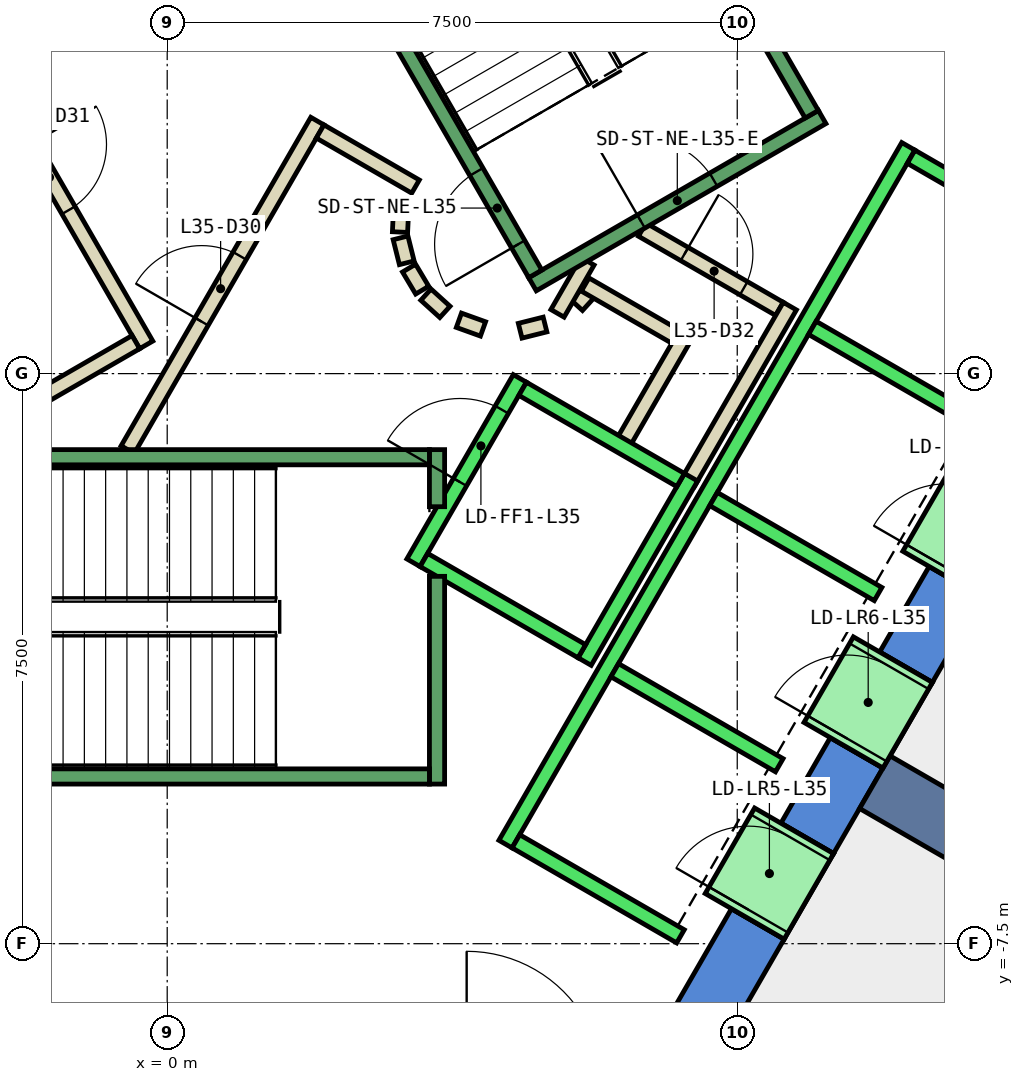
"""IFC4 building model, lengths in metres.
Left out: names, types, materials, properties, quantities, classifications, styles, units other than length and angle.
Written with IfcOpenShell. Run it as: python <this file> out.ifc"""

import sys

from ifc_helpers import new_model, si_unit, direction, frame, frame_2d, origin, place, context, subcontext, project, spatial, polyline, rectangle, outline, extrude, element, fill, save


model = new_model("IFC4")
c1 = context("Model", 3, precision=1e-05, world=origin(), true_north=direction((0.0, 1.0)))
c2 = subcontext(c1, "Body", "Model", "MODEL_VIEW")
j1 = project(units=[si_unit("LENGTHUNIT", "METRE"), si_unit("PLANEANGLEUNIT", "RADIAN")], contexts=[c1])
p1 = place(None, origin())
s1 = spatial("IfcSite", under=j1, at=p1, CompositionType="ELEMENT")
p2 = place(p1, origin())
s2 = spatial("IfcBuilding", under=s1, at=p2, CompositionType="ELEMENT")
p3 = place(p2, frame((0.0, 0.0, 159.2)))
s3 = spatial("IfcBuildingStorey", under=s2, at=p3, CompositionType="ELEMENT", Elevation=159.2)
p4 = place(p3, frame((0.0, 0.0, -0.4)))
e1 = element("IfcWall", 1, at=p4, inside=s3, PredefinedType="SHEAR", context=c2, shape_type="SweptSolid", body=[
    extrude(outline(polyline([(8.517, 11.748), (7.824, 11.348), (12.933, 2.5), (13.856, 2.5), (8.517, 11.748)])), origin(), (0.0, 0.0, 1.0), 4.2),
])
p5 = place(p3, frame((0.0, 0.0, -0.4)))
e2 = element("IfcWall", 2, at=p5, inside=s3, PredefinedType="SHEAR", context=c2, shape_type="SweptSolid", body=[
    extrude(outline(polyline([(8.117, -7.44), (7.424, -7.04), (6.466, -8.7), (6.928, -9.5), (8.117, -7.44)])), origin(), (0.0, 0.0, 1.0), 4.2),
])
p6 = place(p3, frame((0.0, 0.0, -0.4)))
e3 = element("IfcWall", 3, at=p6, inside=s3, PredefinedType="SHEAR", context=c2, shape_type="SweptSolid", body=[
    extrude(outline(polyline([(9.417, -5.189), (8.724, -4.789), (8.075, -5.914), (8.767, -6.314), (9.417, -5.189)])), origin(), (0.0, 0.0, 1.0), 4.2),
])
p7 = place(p3, frame((0.0, 0.0, -0.4)))
e4 = element("IfcWall", 4, at=p7, inside=s3, PredefinedType="SHEAR", context=c2, shape_type="SweptSolid", body=[
    extrude(outline(polyline([(10.717, -2.937), (10.025, -2.537), (9.374, -3.663), (10.067, -4.063), (10.717, -2.937)])), origin(), (0.0, 0.0, 1.0), 4.2),
])
p8 = place(p3, frame((0.0, 0.0, 3.6)))
e5 = element("IfcWall", 5, at=p8, inside=s3, PredefinedType="SHEAR", context=c2, shape_type="SweptSolid", body=[
    extrude(outline(polyline([(8.767, -6.314), (8.075, -5.914), (7.424, -7.04), (8.117, -7.44), (8.767, -6.314)])), origin(), (0.0, 0.0, 1.0), 0.2),
])
p9 = place(p3, frame((0.0, 0.0, 3.6)))
e6 = element("IfcWall", 6, at=p9, inside=s3, PredefinedType="SHEAR", context=c2, shape_type="SweptSolid", body=[
    extrude(outline(polyline([(10.067, -4.063), (9.374, -3.663), (8.724, -4.789), (9.417, -5.189), (10.067, -4.063)])), origin(), (0.0, 0.0, 1.0), 0.2),
])
p10 = place(p3, frame((0.0, 0.0, 3.6)))
e7 = element("IfcWall", 7, at=p10, inside=s3, PredefinedType="SHEAR", context=c2, shape_type="SweptSolid", body=[
    extrude(outline(polyline([(11.367, -1.811), (10.675, -1.411), (10.025, -2.537), (10.717, -2.937), (11.367, -1.811)])), origin(), (0.0, 0.0, 1.0), 0.2),
])
p11 = place(p3, frame((9.31, -5.375, -0.4), z_axis=(0.0, 0.0, 1.0), x_axis=(0.866017533419, -0.500013631625, 0.0)))
e8 = element("IfcWall", 8, at=p11, inside=s3, PredefinedType="SHEAR", context=c2, shape_type="SweptSolid", body=[
    extrude(rectangle(XDim=9.0, YDim=0.8, at=frame_2d((4.5, 0.0))), origin(), (0.0, 0.0, 1.0), 4.2),
])
p12 = place(p3, frame((5.39, 0.898, 0.0), z_axis=(0.0, 0.0, 1.0), x_axis=(0.673828488714, 0.738887791073, 0.0)))
e9 = element("IfcWall", 9, at=p12, inside=s3, PredefinedType="PARTITIONING", context=c2, shape_type="SweptSolid", body=[
    extrude(rectangle(XDim=0.263, YDim=0.2, at=frame_2d((0.131, 0.0))), origin(), (0.0, 0.0, 1.0), 3.8),
])
p13 = place(p3, frame((5.499, 1.172, 0.0), z_axis=(0.0, 0.0, 1.0), x_axis=(0.866333505267, -0.499465972466, 0.0)))
e10 = element("IfcWall", 10, at=p13, inside=s3, PredefinedType="PARTITIONING", context=c2, shape_type="SweptSolid", body=[
    extrude(rectangle(XDim=1.374, YDim=0.2, at=frame_2d((0.687, 0.0))), origin(), (0.0, 0.0, 1.0), 3.8),
])
p14 = place(p3, frame((6.826, 0.522, 0.0), z_axis=(0.0, 0.0, 1.0), x_axis=(-0.500016722714, -0.866015748706, 0.0)))
e11 = element("IfcWall", 11, at=p14, inside=s3, PredefinedType="PARTITIONING", context=c2, shape_type="SweptSolid", body=[
    extrude(rectangle(XDim=1.7, YDim=0.2, at=frame_2d((0.85, 0.0))), origin(), (0.0, 0.0, 1.0), 3.8),
])
p15 = place(p3, frame((6.25, 1.894, 0.0), z_axis=(0.0, 0.0, 1.0), x_axis=(0.866043184279, -0.499969202016, 0.0)))
e12 = element("IfcWall", 12, at=p15, inside=s3, PredefinedType="PARTITIONING", context=c2, shape_type="SweptSolid", body=[
    extrude(rectangle(XDim=2.084, YDim=0.2, at=frame_2d((1.042, 0.0))), origin(), (0.0, 0.0, 1.0), 3.8),
])
p16 = place(p15, frame((0.642, 0.0, 0.0)))
e13 = element("IfcOpeningElement", 13, at=p16, cuts=e12, PredefinedType="OPENING", context=c2, shape_type="SweptSolid", body=[
    extrude(rectangle(XDim=0.9, YDim=2.1, at=frame_2d((0.45, 1.05))), frame((0.0, 0.11, 0.0), z_axis=(0.0, -1.0, 0.0), x_axis=(1.0, 0.0, 0.0)), (0.0, 0.0, 1.0), 0.22),
])
p17 = place(p3, frame((8.192, 0.888, 0.0), z_axis=(0.0, 0.0, 1.0), x_axis=(-0.499940625693, -0.866059680843, 0.0)))
e14 = element("IfcWall", 14, at=p17, inside=s3, PredefinedType="PARTITIONING", context=c2, shape_type="SweptSolid", body=[
    extrude(rectangle(XDim=2.68, YDim=0.2, at=frame_2d((1.34, 0.0))), origin(), (0.0, 0.0, 1.0), 3.8),
])
p18 = place(p3, frame((5.135, 0.793, 0.0), z_axis=(0.0, 0.0, 1.0), x_axis=(0.499526442893, 0.866298639529, 0.0)))
e15 = element("IfcWall", 15, at=p18, inside=s3, PredefinedType="PARTITIONING", context=c2, shape_type="SweptSolid", body=[
    extrude(rectangle(XDim=0.791, YDim=0.2, at=frame_2d((0.396, 0.0))), origin(), (0.0, 0.0, 1.0), 3.8),
])
p19 = place(p3, frame((-0.52, -1.0, 0.0), z_axis=(0.0, 0.0, 1.0), x_axis=(0.50011622646, 0.865958290007, 0.0)))
e16 = element("IfcWall", 16, at=p19, inside=s3, PredefinedType="PARTITIONING", context=c2, shape_type="SweptSolid", body=[
    extrude(rectangle(XDim=4.991, YDim=0.2, at=frame_2d((2.496, 0.0))), origin(), (0.0, 0.0, 1.0), 3.8),
])
p20 = place(p19, frame((1.945, 0.0, 0.0)))
e17 = element("IfcOpeningElement", 17, at=p20, cuts=e16, PredefinedType="OPENING", context=c2, shape_type="SweptSolid", body=[
    extrude(rectangle(XDim=1.0, YDim=2.1, at=frame_2d((0.5, 1.05))), frame((0.0, 0.11, 0.0), z_axis=(0.0, -1.0, 0.0), x_axis=(1.0, 0.0, 0.0)), (0.0, 0.0, 1.0), 0.22),
])
p21 = place(p3, frame((2.012, 3.186, 0.0), z_axis=(0.0, 0.0, 1.0), x_axis=(0.865891012941, -0.500232699559, 0.0)))
e18 = element("IfcWall", 18, at=p21, inside=s3, PredefinedType="PARTITIONING", context=c2, shape_type="SweptSolid", body=[
    extrude(rectangle(XDim=1.449, YDim=0.2, at=frame_2d((0.725, 0.0))), origin(), (0.0, 0.0, 1.0), 3.8),
])
p22 = place(p3, frame((3.079, 2.199, 0.0), z_axis=(0.0, 0.0, 1.0), x_axis=(-0.047771483479, -0.998858290933, 0.0)))
e19 = element("IfcWall", 19, at=p22, inside=s3, PredefinedType="PARTITIONING", context=c2, shape_type="SweptSolid", body=[
    extrude(rectangle(XDim=0.337, YDim=0.2, at=frame_2d((0.169, 0.0))), origin(), (0.0, 0.0, 1.0), 3.8),
])
p23 = place(p3, frame((3.07, 1.786, 0.0), z_axis=(0.0, 0.0, 1.0), x_axis=(0.242705583207, -0.970099994784, 0.0)))
e20 = element("IfcWall", 20, at=p23, inside=s3, PredefinedType="PARTITIONING", context=c2, shape_type="SweptSolid", body=[
    extrude(rectangle(XDim=0.338, YDim=0.2, at=frame_2d((0.169, 0.0))), origin(), (0.0, 0.0, 1.0), 3.8),
])
for number, where, z_axis, x_axis in (
    (21, (3.182, 1.388, 0.0), (0.0, 0.0, 1.0), (0.512, -0.859, 0.0)),
    (22, (3.404, 1.039, 0.0), (0.0, 0.0, 1.0), (0.74, -0.672, 0.0)),
):
    element("IfcWall", number, at=place(p3, frame(where, z_axis=z_axis, x_axis=x_axis)), inside=s3, PredefinedType="PARTITIONING", context=c2, shape_type="SweptSolid", body=[
        extrude(rectangle(XDim=0.338, YDim=0.2, at=frame_2d((0.169, 0.0))), origin(), (0.0, 0.0, 1.0), 3.8),
    ])
p24 = place(p3, frame((3.838, 0.702, 0.0), z_axis=(0.0, 0.0, 1.0), x_axis=(0.941035081519, -0.338308993895, 0.0)))
e23 = element("IfcWall", 23, at=p24, inside=s3, PredefinedType="PARTITIONING", context=c2, shape_type="SweptSolid", body=[
    extrude(rectangle(XDim=0.337, YDim=0.2, at=frame_2d((0.168, 0.0))), origin(), (0.0, 0.0, 1.0), 3.8),
])
p25 = place(p3, frame((4.644, 0.564, 0.0), z_axis=(0.0, 0.0, 1.0), x_axis=(0.969929076366, 0.243387729394, 0.0)))
e24 = element("IfcWall", 24, at=p25, inside=s3, PredefinedType="PARTITIONING", context=c2, shape_type="SweptSolid", body=[
    extrude(rectangle(XDim=0.337, YDim=0.2, at=frame_2d((0.168, 0.0))), origin(), (0.0, 0.0, 1.0), 3.8),
])
p26 = place(p3, frame((-2.771, 4.7, 0.0), z_axis=(0.0, 0.0, 1.0), x_axis=(0.499969479948, -0.866043023828, 0.0)))
e25 = element("IfcWall", 25, at=p26, inside=s3, PredefinedType="PARTITIONING", context=c2, shape_type="SweptSolid", body=[
    extrude(rectangle(XDim=4.99, YDim=0.2, at=frame_2d((2.495, 0.0))), origin(), (0.0, 0.0, 1.0), 3.8),
])
p27 = place(p26, frame((1.945, 0.0, 0.0)))
e26 = element("IfcOpeningElement", 26, at=p27, cuts=e25, PredefinedType="OPENING", context=c2, shape_type="SweptSolid", body=[
    extrude(rectangle(XDim=1.0, YDim=2.1, at=frame_2d((0.5, 1.05))), frame((0.0, 0.11, 0.0), z_axis=(0.0, -1.0, 0.0), x_axis=(1.0, 0.0, 0.0)), (0.0, 0.0, 1.0), 0.22),
])
p28 = place(p3, frame((-0.412, 0.414, 0.0), z_axis=(0.0, 0.0, 1.0), x_axis=(-0.866017369001, -0.500013916395, 0.0)))
e27 = element("IfcWall", 27, at=p28, inside=s3, PredefinedType="PARTITIONING", context=c2, shape_type="SweptSolid", body=[
    extrude(rectangle(XDim=1.45, YDim=0.2, at=frame_2d((0.725, 0.0))), origin(), (0.0, 0.0, 1.0), 3.8),
])
p29 = place(p3, frame((12.401, -7.621, 0.0), z_axis=(0.0, 0.0, 1.0), x_axis=(-0.499983724212, -0.866034800411, 0.0)))
e28 = element("IfcWall", 28, at=p29, inside=s3, PredefinedType="PARTITIONING", context=c2, shape_type="SweptSolid", body=[
    extrude(rectangle(XDim=9.302, YDim=0.2, at=frame_2d((4.651, 0.0))), origin(), (0.0, 0.0, 1.0), 3.8),
])
p30 = place(p3, frame((3.24, -2.488, 0.0), z_axis=(0.0, 0.0, 1.0), x_axis=(0.49994636267, 0.866056369097, 0.0)))
e29 = element("IfcWall", 29, at=p30, inside=s3, PredefinedType="STANDARD", context=c2, shape_type="SweptSolid", body=[
    extrude(rectangle(XDim=2.8, YDim=0.2, at=frame_2d((1.4, 0.0))), origin(), (0.0, 0.0, 1.0), 3.8),
])
p31 = place(p30, frame((1.225, 0.0, 0.0)))
e30 = element("IfcOpeningElement", 30, at=p31, cuts=e29, PredefinedType="OPENING", context=c2, shape_type="SweptSolid", body=[
    extrude(rectangle(XDim=1.1, YDim=2.1, at=frame_2d((0.55, 1.05))), frame((0.0, 0.11, 0.0), z_axis=(0.0, -1.0, 0.0), x_axis=(1.0, 0.0, 0.0)), (0.0, 0.0, 1.0), 0.22),
])
p32 = place(p3, frame((5.492, -3.788, 0.0), z_axis=(0.0, 0.0, 1.0), x_axis=(0.500011755427, 0.866018616679, 0.0)))
e31 = element("IfcWall", 31, at=p32, inside=s3, PredefinedType="STANDARD", context=c2, shape_type="SweptSolid", body=[
    extrude(rectangle(XDim=2.8, YDim=0.2, at=frame_2d((1.4, 0.0))), origin(), (0.0, 0.0, 1.0), 3.8),
])
p33 = place(p3, frame((3.377, -2.452, 0.0), z_axis=(0.0, 0.0, 1.0), x_axis=(0.865955154139, -0.50012165622, 0.0)))
e32 = element("IfcWall", 32, at=p33, inside=s3, PredefinedType="STANDARD", context=c2, shape_type="SweptSolid", body=[
    extrude(rectangle(XDim=2.4, YDim=0.2, at=frame_2d((1.2, 0.0))), origin(), (0.0, 0.0, 1.0), 3.8),
])
p34 = place(p3, frame((4.677, -0.2, 0.0), z_axis=(0.0, 0.0, 1.0), x_axis=(0.865973769406, -0.500089422704, 0.0)))
e33 = element("IfcWall", 33, at=p34, inside=s3, PredefinedType="STANDARD", context=c2, shape_type="SweptSolid", body=[
    extrude(rectangle(XDim=2.399, YDim=0.2, at=frame_2d((1.2, 0.0))), origin(), (0.0, 0.0, 1.0), 3.8),
])
p35 = place(p3, frame((4.451, -6.19, 0.0), z_axis=(0.0, 0.0, 1.0), x_axis=(0.50000090737, 0.866024879913, 0.0)))
e34 = element("IfcWall", 34, at=p35, inside=s3, PredefinedType="STANDARD", context=c2, shape_type="SweptSolid", body=[
    extrude(rectangle(XDim=10.6, YDim=0.2, at=frame_2d((5.3, 0.0))), origin(), (0.0, 0.0, 1.0), 3.8),
])
for number, where, z_axis, x_axis in (
    (35, (4.588, -6.153, 0.0), (0.0, 0.0, 1.0), (0.866, -0.5, 0.0)),
    (36, (5.888, -3.902, 0.0), (0.0, 0.0, 1.0), (0.866, -0.5, 0.0)),
    (37, (7.188, -1.65, 0.0), (0.0, 0.0, 1.0), (0.866, -0.5, 0.0)),
    (38, (8.488, 0.602, 0.0), (0.0, 0.0, 1.0), (0.866, -0.5, 0.0)),
):
    element("IfcWall", number, at=place(p3, frame(where, z_axis=z_axis, x_axis=x_axis)), inside=s3, PredefinedType="STANDARD", context=c2, shape_type="SweptSolid", body=[
        extrude(rectangle(XDim=2.5, YDim=0.2, at=frame_2d((1.25, 0.0))), origin(), (0.0, 0.0, 1.0), 3.8),
    ])
p36 = place(p3, frame((9.788, 2.853, 0.0), z_axis=(0.0, 0.0, 1.0), x_axis=(0.865998541277, -0.500046524342, 0.0)))
e39 = element("IfcWall", 39, at=p36, inside=s3, PredefinedType="STANDARD", context=c2, shape_type="SweptSolid", body=[
    extrude(rectangle(XDim=2.5, YDim=0.2, at=frame_2d((1.25, 0.0))), origin(), (0.0, 0.0, 1.0), 3.8),
])
p37 = place(p3, frame((7.598, -7.14, 0.0), z_axis=(0.0, 0.0, 1.0), x_axis=(0.500362116554, 0.865816234728, 0.0)))
e40 = element("IfcWall", 40, at=p37, inside=s3, PredefinedType="STANDARD", context=c2, shape_type="SweptSolid", body=[
    extrude(rectangle(XDim=1.299, YDim=1.2, at=frame_2d((0.65, 0.0))), origin(), (0.0, 0.0, 1.0), 2.4),
])
p38 = place(p37, frame((0.1, 0.0, 0.0)))
e41 = element("IfcOpeningElement", 41, at=p38, cuts=e40, PredefinedType="OPENING", context=c2, shape_type="SweptSolid", body=[
    extrude(rectangle(XDim=1.1, YDim=2.3, at=frame_2d((0.55, 1.15))), frame((0.0, 0.61, 0.0), z_axis=(0.0, -1.0, 0.0), x_axis=(1.0, 0.0, 0.0)), (0.0, 0.0, 1.0), 1.22),
])
p39 = place(p3, frame((8.898, -4.889, 0.0), z_axis=(0.0, 0.0, 1.0), x_axis=(0.500036693733, 0.866004217611, 0.0)))
e42 = element("IfcWall", 42, at=p39, inside=s3, PredefinedType="STANDARD", context=c2, shape_type="SweptSolid", body=[
    extrude(rectangle(XDim=1.3, YDim=1.2, at=frame_2d((0.65, 0.0))), origin(), (0.0, 0.0, 1.0), 2.4),
])
p40 = place(p39, frame((0.1, 0.0, 0.0)))
e43 = element("IfcOpeningElement", 43, at=p40, cuts=e42, PredefinedType="OPENING", context=c2, shape_type="SweptSolid", body=[
    extrude(rectangle(XDim=1.1, YDim=2.3, at=frame_2d((0.55, 1.15))), frame((0.0, 0.61, 0.0), z_axis=(0.0, -1.0, 0.0), x_axis=(1.0, 0.0, 0.0)), (0.0, 0.0, 1.0), 1.22),
])
p41 = place(p3, frame((10.198, -2.637, 0.0), z_axis=(0.0, 0.0, 1.0), x_axis=(0.49989585183, 0.866085525409, 0.0)))
e44 = element("IfcWall", 44, at=p41, inside=s3, PredefinedType="STANDARD", context=c2, shape_type="SweptSolid", body=[
    extrude(rectangle(XDim=1.3, YDim=1.2, at=frame_2d((0.65, 0.0))), origin(), (0.0, 0.0, 1.0), 2.4),
])
p42 = place(p41, frame((0.1, 0.0, 0.0)))
e45 = element("IfcOpeningElement", 45, at=p42, cuts=e44, PredefinedType="OPENING", context=c2, shape_type="SweptSolid", body=[
    extrude(rectangle(XDim=1.1, YDim=2.3, at=frame_2d((0.55, 1.15))), frame((0.0, 0.61, 0.0), z_axis=(0.0, -1.0, 0.0), x_axis=(1.0, 0.0, 0.0)), (0.0, 0.0, 1.0), 1.22),
])
p43 = place(p3, frame((3.55, -2.667, 0.0), z_axis=(0.0, 0.0, 1.0), x_axis=(0.0, -1.0, 0.0)))
e46 = element("IfcWall", 46, at=p43, inside=s3, PredefinedType="STANDARD", context=c2, shape_type="SweptSolid", body=[
    extrude(rectangle(XDim=2.733, YDim=0.2, at=frame_2d((1.366, 0.0))), origin(), (0.0, 0.0, 1.0), 3.8),
])
p44 = place(p3, frame((3.55, -1.0, 0.0), z_axis=(0.0, 0.0, 1.0), x_axis=(0.0, -1.0, 0.0)))
e47 = element("IfcWall", 47, at=p44, inside=s3, PredefinedType="STANDARD", context=c2, shape_type="SweptSolid", body=[
    extrude(rectangle(XDim=0.751, YDim=0.2, at=frame_2d((0.375, 0.0))), origin(), (0.0, 0.0, 1.0), 3.8),
])
p45 = place(p3, frame((-3.45, -1.1, 0.0), z_axis=(0.0, 0.0, 1.0), x_axis=(1.0, 0.0, 0.0)))
e48 = element("IfcWall", 48, at=p45, inside=s3, PredefinedType="STANDARD", context=c2, shape_type="SweptSolid", body=[
    extrude(rectangle(XDim=6.9, YDim=0.2, at=frame_2d((3.45, 0.0))), origin(), (0.0, 0.0, 1.0), 3.8),
])
p46 = place(p45, frame((0.45, 0.0, 0.0)))
e49 = element("IfcOpeningElement", 49, at=p46, cuts=e48, PredefinedType="OPENING", context=c2, shape_type="SweptSolid", body=[
    extrude(rectangle(XDim=1.1, YDim=2.2, at=frame_2d((0.55, 1.1))), frame((0.0, 0.11, 0.0), z_axis=(0.0, -1.0, 0.0), x_axis=(1.0, 0.0, 0.0)), (0.0, 0.0, 1.0), 0.22),
])
p47 = place(p3, frame((-3.45, -5.3, 0.0), z_axis=(0.0, 0.0, 1.0), x_axis=(1.0, 0.0, 0.0)))
e50 = element("IfcWall", 50, at=p47, inside=s3, PredefinedType="STANDARD", context=c2, shape_type="SweptSolid", body=[
    extrude(rectangle(XDim=6.9, YDim=0.2, at=frame_2d((3.45, 0.0))), origin(), (0.0, 0.0, 1.0), 3.8),
])
p48 = place(p3, frame((4.806, 1.176, 0.0), z_axis=(0.0, 0.0, 1.0), x_axis=(0.866059941101, 0.499940174841, 0.0)))
e51 = element("IfcWall", 51, at=p48, inside=s3, PredefinedType="STANDARD", context=c2, shape_type="SweptSolid", body=[
    extrude(rectangle(XDim=4.4, YDim=0.2, at=frame_2d((2.2, 0.0))), origin(), (0.0, 0.0, 1.0), 3.8),
])
p49 = place(p48, frame((1.65, 0.0, 0.0)))
e52 = element("IfcOpeningElement", 52, at=p49, cuts=e51, PredefinedType="OPENING", context=c2, shape_type="SweptSolid", body=[
    extrude(rectangle(XDim=1.1, YDim=2.2, at=frame_2d((0.55, 1.1))), frame((0.0, 0.11, 0.0), z_axis=(0.0, -1.0, 0.0), x_axis=(1.0, 0.0, 0.0)), (0.0, 0.0, 1.0), 0.22),
])
p50 = place(p3, frame((4.843, 1.312, 0.0), z_axis=(0.0, 0.0, 1.0), x_axis=(-0.499963383562, 0.866046543262, 0.0)))
e53 = element("IfcWall", 53, at=p50, inside=s3, PredefinedType="STANDARD", context=c2, shape_type="SweptSolid", body=[
    extrude(rectangle(XDim=6.9, YDim=0.2, at=frame_2d((3.45, 0.0))), origin(), (0.0, 0.0, 1.0), 3.8),
])
p51 = place(p50, frame((0.45, 0.0, 0.0)))
e54 = element("IfcOpeningElement", 54, at=p51, cuts=e53, PredefinedType="OPENING", context=c2, shape_type="SweptSolid", body=[
    extrude(rectangle(XDim=1.1, YDim=2.2, at=frame_2d((0.55, 1.1))), frame((0.0, 0.11, 0.0), z_axis=(0.0, -1.0, 0.0), x_axis=(1.0, 0.0, 0.0)), (0.0, 0.0, 1.0), 0.22),
])
p52 = place(p3, frame((8.48, 3.412, 0.0), z_axis=(0.0, 0.0, 1.0), x_axis=(-0.499978703459, 0.866037698999, 0.0)))
e55 = element("IfcWall", 55, at=p52, inside=s3, PredefinedType="STANDARD", context=c2, shape_type="SweptSolid", body=[
    extrude(rectangle(XDim=6.9, YDim=0.2, at=frame_2d((3.45, 0.0))), origin(), (0.0, 0.0, 1.0), 3.8),
])
p53 = place(p3, frame((-1.393, 7.288, 0.0), z_axis=(0.0, 0.0, 1.0), x_axis=(-0.499963383562, -0.866046543262, 0.0)))
e56 = element("IfcWall", 56, at=p53, inside=s3, PredefinedType="STANDARD", context=c2, shape_type="SweptSolid", body=[
    extrude(rectangle(XDim=6.9, YDim=0.2, at=frame_2d((3.45, 0.0))), origin(), (0.0, 0.0, 1.0), 3.8),
])
p54 = place(p53, frame((0.45, 0.0, 0.0)))
e57 = element("IfcOpeningElement", 57, at=p54, cuts=e56, PredefinedType="OPENING", context=c2, shape_type="SweptSolid", body=[
    extrude(rectangle(XDim=1.1, YDim=2.2, at=frame_2d((0.55, 1.1))), frame((0.0, 0.11, 0.0), z_axis=(0.0, -1.0, 0.0), x_axis=(1.0, 0.0, 0.0)), (0.0, 0.0, 1.0), 0.22),
])
p55 = place(p20, origin())
e58 = element("IfcDoor", 58, at=p55, inside=s3, OperationType="SINGLE_SWING_LEFT", PredefinedType="DOOR", context=c2, shape_type="SweptSolid", body=[
    extrude(rectangle(XDim=1.0, YDim=2.1, at=frame_2d((0.5, 1.05))), frame((0.0, 0.025, 0.0), z_axis=(0.0, -1.0, 0.0), x_axis=(1.0, 0.0, 0.0)), (0.0, 0.0, 1.0), 0.05),
])
fill(e17, e58)
p56 = place(p27, origin())
e59 = element("IfcDoor", 59, at=p56, inside=s3, OperationType="SINGLE_SWING_RIGHT", PredefinedType="DOOR", context=c2, shape_type="SweptSolid", body=[
    extrude(rectangle(XDim=1.0, YDim=2.1, at=frame_2d((0.5, 1.05))), frame((0.0, 0.025, 0.0), z_axis=(0.0, -1.0, 0.0), x_axis=(1.0, 0.0, 0.0)), (0.0, 0.0, 1.0), 0.05),
])
fill(e26, e59)
p57 = place(p16, origin())
e60 = element("IfcDoor", 60, at=p57, inside=s3, OperationType="SINGLE_SWING_LEFT", PredefinedType="DOOR", context=c2, shape_type="SweptSolid", body=[
    extrude(rectangle(XDim=0.9, YDim=2.1, at=frame_2d((0.45, 1.05))), frame((0.0, 0.025, 0.0), z_axis=(0.0, -1.0, 0.0), x_axis=(1.0, 0.0, 0.0)), (0.0, 0.0, 1.0), 0.05),
])
fill(e13, e60)
p58 = place(p38, origin())
e61 = element("IfcDoor", 61, at=p58, inside=s3, OperationType="SLIDING_TO_LEFT", PredefinedType="DOOR", context=c2, shape_type="SweptSolid", body=[
    extrude(rectangle(XDim=1.1, YDim=2.3, at=frame_2d((0.55, 1.15))), frame((0.0, 0.025, 0.0), z_axis=(0.0, -1.0, 0.0), x_axis=(1.0, 0.0, 0.0)), (0.0, 0.0, 1.0), 0.05),
])
fill(e41, e61)
p59 = place(p40, origin())
e62 = element("IfcDoor", 62, at=p59, inside=s3, OperationType="SLIDING_TO_LEFT", PredefinedType="DOOR", context=c2, shape_type="SweptSolid", body=[
    extrude(rectangle(XDim=1.1, YDim=2.3, at=frame_2d((0.55, 1.15))), frame((0.0, 0.025, 0.0), z_axis=(0.0, -1.0, 0.0), x_axis=(1.0, 0.0, 0.0)), (0.0, 0.0, 1.0), 0.05),
])
fill(e43, e62)
p60 = place(p31, origin())
e63 = element("IfcDoor", 63, at=p60, inside=s3, OperationType="SLIDING_TO_LEFT", PredefinedType="DOOR", context=c2, shape_type="SweptSolid", body=[
    extrude(rectangle(XDim=1.1, YDim=2.1, at=frame_2d((0.55, 1.05))), frame((0.0, 0.025, 0.0), z_axis=(0.0, -1.0, 0.0), x_axis=(1.0, 0.0, 0.0)), (0.0, 0.0, 1.0), 0.05),
])
fill(e30, e63)
p61 = place(p51, origin())
e64 = element("IfcDoor", 64, at=p61, inside=s3, OperationType="SINGLE_SWING_LEFT", PredefinedType="DOOR", context=c2, shape_type="SweptSolid", body=[
    extrude(rectangle(XDim=1.1, YDim=2.2, at=frame_2d((0.55, 1.1))), frame((0.0, 0.025, 0.0), z_axis=(0.0, -1.0, 0.0), x_axis=(1.0, 0.0, 0.0)), (0.0, 0.0, 1.0), 0.05),
])
fill(e54, e64)
p62 = place(p49, origin())
e65 = element("IfcDoor", 65, at=p62, inside=s3, OperationType="SINGLE_SWING_LEFT", PredefinedType="DOOR", context=c2, shape_type="SweptSolid", body=[
    extrude(rectangle(XDim=1.1, YDim=2.2, at=frame_2d((0.55, 1.1))), frame((0.0, 0.025, 0.0), z_axis=(0.0, -1.0, 0.0), x_axis=(1.0, 0.0, 0.0)), (0.0, 0.0, 1.0), 0.05),
])
fill(e52, e65)
save(model, sys.argv[1])
